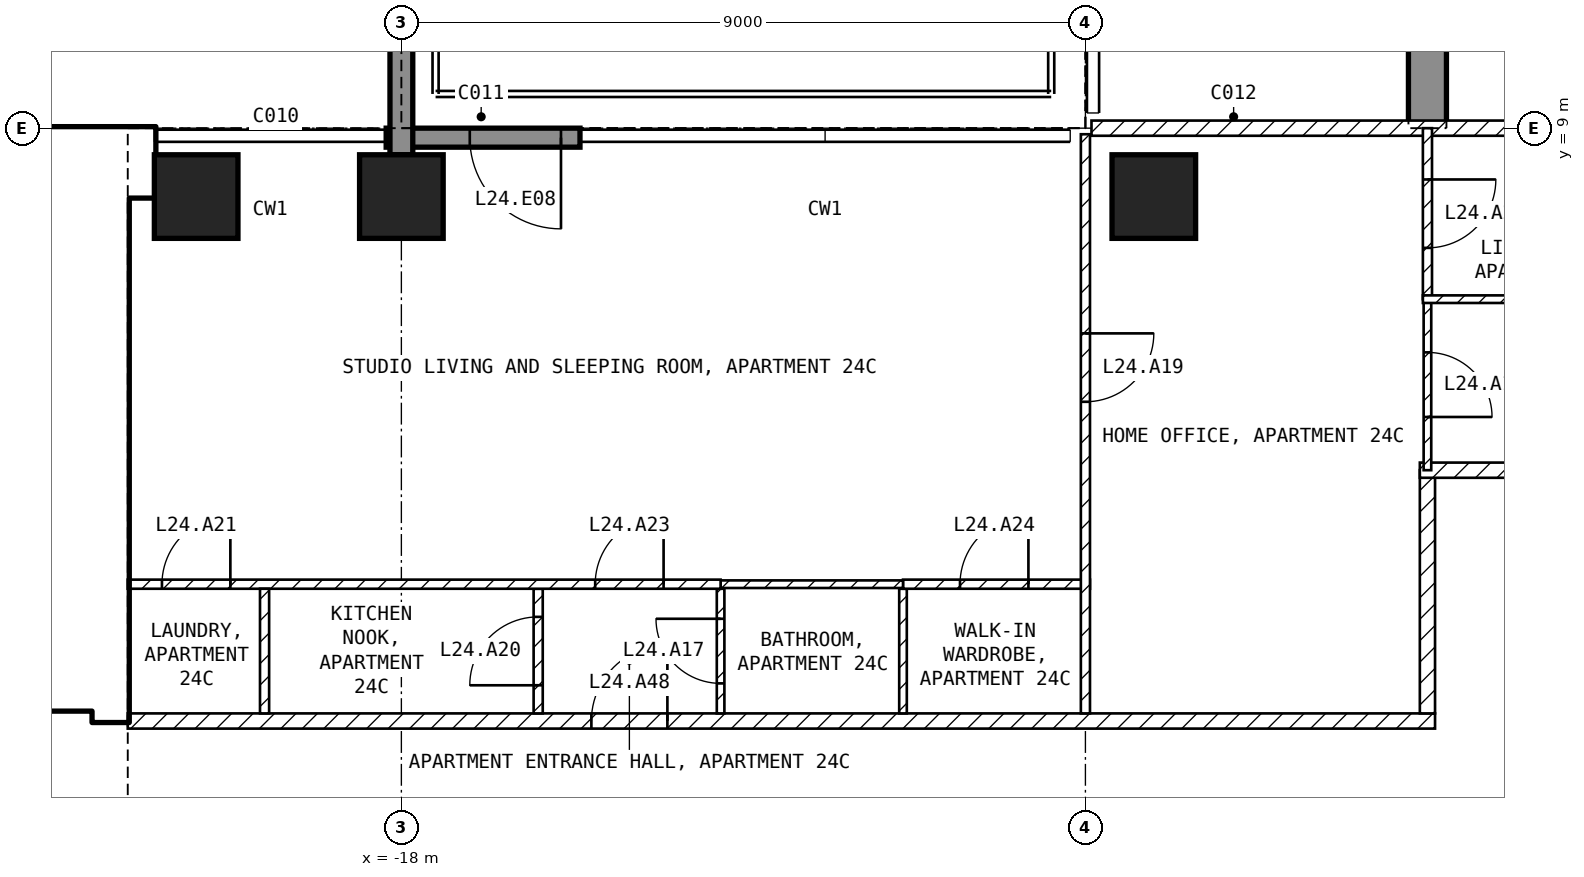
"""IFC4 building model, lengths in metres.
Left out: names, types, materials, properties, quantities, classifications, styles, units other than length and angle.
Written with IfcOpenShell. Run it as: python <this file> out.ifc"""

import sys

from ifc_helpers import new_model, si_unit, direction, frame, frame_2d, origin, origin_2d, place, context, subcontext, project, spatial, polyline, rectangle, outline, extrude, element, fill, save


model = new_model("IFC4")
c1 = context("Model", 3, precision=1e-05, world=origin(), true_north=direction((0.0, 1.0)))
c2 = subcontext(c1, "Body", "Model", "MODEL_VIEW")
j1 = project(units=[si_unit("LENGTHUNIT", "METRE"), si_unit("PLANEANGLEUNIT", "RADIAN")], contexts=[c1])
p1 = place(None, origin())
s1 = spatial("IfcSite", under=j1, at=p1, CompositionType="ELEMENT")
p2 = place(p1, origin())
s2 = spatial("IfcBuilding", under=s1, at=p2, CompositionType="ELEMENT")
p3 = place(p2, frame((0.0, 0.0, 105.9)))
s3 = spatial("IfcBuildingStorey", under=s2, at=p3, CompositionType="ELEMENT", Elevation=105.9)
for number, where, z_axis, x_axis in (
    (1, (-20.7, 8.1, -0.25), (0.0, 0.0, 1.0), (1.0, 0.0, 0.0)),
    (2, (-18.0, 8.1, -0.25), (0.0, 0.0, 1.0), (1.0, 0.0, 0.0)),
    (3, (-8.1, 8.1, -0.25), (0.0, 0.0, 1.0), (1.0, 0.0, 0.0)),
):
    element("IfcColumn", number, at=place(p3, frame(where, z_axis=z_axis, x_axis=x_axis)), inside=s3, PredefinedType="COLUMN", context=c2, shape_type="SweptSolid", body=[
        extrude(rectangle(XDim=1.1, YDim=1.1, at=origin_2d()), origin(), (0.0, 0.0, 1.0), 3.5),
    ])
p4 = place(p3, frame((-4.75, 9.0, -0.25), z_axis=(1.0, 0.0, 0.0), x_axis=(0.0, 1.0, 0.0)))
e4 = element("IfcWall", 4, at=p4, inside=s3, PredefinedType="SHEAR", context=c2, shape_type="SweptSolid", body=[
    extrude(outline(polyline([(0.0, 0.0), (2.1, 0.0), (2.1, 2.65), (4.5, 2.65), (4.5, 0.0), (9.9, 0.0), (9.9, 2.65), (12.3, 2.65), (12.3, 0.0), (16.55, 0.0), (16.55, 3.5), (0.0, 3.5), (0.0, 0.0)])), origin(), (0.0, 0.0, 1.0), 0.5),
])
p5 = place(p3, frame((-15.65, 8.875, 0.0), z_axis=(0.0, 0.0, 1.0), x_axis=(-1.0, 0.0, 0.0)))
e5 = element("IfcWall", 5, at=p5, inside=s3, PredefinedType="SOLIDWALL", context=c2, shape_type="SweptSolid", body=[
    extrude(rectangle(XDim=2.55, YDim=0.25, at=frame_2d((1.275, 0.0))), origin(), (0.0, 0.0, 1.0), 3.25),
])
p6 = place(p5, frame((0.25, 0.0, 0.0)))
e6 = element("IfcOpeningElement", 6, at=p6, cuts=e5, PredefinedType="OPENING", context=c2, shape_type="SweptSolid", body=[
    extrude(rectangle(XDim=1.2, YDim=2.4, at=frame_2d((0.6, 1.2))), frame((0.0, 0.135, 0.0), z_axis=(0.0, -1.0, 0.0), x_axis=(1.0, 0.0, 0.0)), (0.0, 0.0, 1.0), 0.27),
])
p7 = place(p3, frame((-18.0, 8.65, 0.0), z_axis=(0.0, 0.0, 1.0), x_axis=(0.0, 1.0, 0.0)))
e7 = element("IfcWall", 7, at=p7, inside=s3, PredefinedType="SOLIDWALL", context=c2, shape_type="SweptSolid", body=[
    extrude(rectangle(XDim=3.09, YDim=0.3, at=frame_2d((1.545, 0.0))), origin(), (0.0, 0.0, 1.0), 3.25),
])
p8 = place(p3, frame((-29.45, 8.55, 0.0), z_axis=(0.0, 0.0, 1.0), x_axis=(1.0, 0.0, 0.0)))
e8 = element("IfcWall", 8, at=p8, inside=s3, PredefinedType="SHEAR", context=c2, shape_type="SweptSolid", body=[
    extrude(rectangle(XDim=8.2, YDim=0.9, at=frame_2d((4.1, 0.0))), origin(), (0.0, 0.0, 1.0), 3.25),
])
p9 = place(p3, frame((-21.825, 1.2, 0.0), z_axis=(0.0, 0.0, 1.0), x_axis=(0.0, 1.0, 0.0)))
e9 = element("IfcWall", 9, at=p9, inside=s3, PredefinedType="SHEAR", context=c2, shape_type="SweptSolid", body=[
    extrude(rectangle(XDim=6.9, YDim=0.45, at=frame_2d((3.45, 0.0))), origin(), (0.0, 0.0, 1.0), 3.25),
])
p10 = place(p3, frame((-33.05, 1.45, 0.0), z_axis=(0.0, 0.0, 1.0), x_axis=(1.0, 0.0, 0.0)))
e10 = element("IfcWall", 10, at=p10, inside=s3, PredefinedType="SOLIDWALL", context=c2, shape_type="SweptSolid", body=[
    extrude(rectangle(XDim=11.0, YDim=0.2, at=frame_2d((5.5, 0.0))), origin(), (0.0, 0.0, 1.0), 3.25),
])
p11 = place(p10, frame((9.25, 0.0, 0.0)))
e11 = element("IfcOpeningElement", 11, at=p11, cuts=e10, PredefinedType="OPENING", context=c2, shape_type="SweptSolid", body=[
    extrude(rectangle(XDim=1.0, YDim=2.1, at=frame_2d((0.5, 1.05))), frame((0.0, 0.11, 0.0), z_axis=(0.0, -1.0, 0.0), x_axis=(1.0, 0.0, 0.0)), (0.0, 0.0, 1.0), 0.22),
])
p12 = place(p10, frame((6.75, 0.0, 0.0)))
e12 = element("IfcOpeningElement", 12, at=p12, cuts=e10, PredefinedType="OPENING", context=c2, shape_type="SweptSolid", body=[
    extrude(rectangle(XDim=1.0, YDim=2.1, at=frame_2d((0.5, 1.05))), frame((0.0, 0.11, 0.0), z_axis=(0.0, -1.0, 0.0), x_axis=(1.0, 0.0, 0.0)), (0.0, 0.0, 1.0), 0.22),
])
p13 = place(p10, frame((1.025, 0.0, 0.0)))
e13 = element("IfcOpeningElement", 13, at=p13, cuts=e10, PredefinedType="OPENING", context=c2, shape_type="SweptSolid", body=[
    extrude(rectangle(XDim=0.9, YDim=2.1, at=frame_2d((0.45, 1.05))), frame((0.0, 0.11, 0.0), z_axis=(0.0, -1.0, 0.0), x_axis=(1.0, 0.0, 0.0)), (0.0, 0.0, 1.0), 0.22),
])
p14 = place(p3, frame((-28.35, 5.15, 0.0), z_axis=(0.0, 0.0, 1.0), x_axis=(1.0, 0.0, 0.0)))
e14 = element("IfcWall", 14, at=p14, inside=s3, PredefinedType="SOLIDWALL", context=c2, shape_type="SweptSolid", body=[
    extrude(rectangle(XDim=6.3, YDim=0.2, at=frame_2d((3.15, 0.0))), origin(), (0.0, 0.0, 1.0), 3.25),
])
p15 = place(p14, frame((5.1, 0.0, 0.0)))
e15 = element("IfcOpeningElement", 15, at=p15, cuts=e14, PredefinedType="OPENING", context=c2, shape_type="SweptSolid", body=[
    extrude(rectangle(XDim=1.0, YDim=2.1, at=frame_2d((0.5, 1.05))), frame((0.0, 0.11, 0.0), z_axis=(0.0, -1.0, 0.0), x_axis=(1.0, 0.0, 0.0)), (0.0, 0.0, 1.0), 0.22),
])
p16 = place(p3, frame((-21.6, 1.2, 0.0), z_axis=(0.0, 0.0, 1.0), x_axis=(1.0, 0.0, 0.0)))
e16 = element("IfcWall", 16, at=p16, inside=s3, PredefinedType="PARTITIONING", context=c2, shape_type="SweptSolid", body=[
    extrude(rectangle(XDim=17.2, YDim=0.2, at=frame_2d((8.6, 0.0))), origin(), (0.0, 0.0, 1.0), 3.25),
])
p17 = place(p16, frame((6.1, 0.0, 0.0)))
e17 = element("IfcOpeningElement", 17, at=p17, cuts=e16, PredefinedType="OPENING", context=c2, shape_type="SweptSolid", body=[
    extrude(rectangle(XDim=1.0, YDim=2.1, at=frame_2d((0.5, 1.05))), frame((0.0, 0.11, 0.0), z_axis=(0.0, -1.0, 0.0), x_axis=(1.0, 0.0, 0.0)), (0.0, 0.0, 1.0), 0.22),
])
p18 = place(p3, frame((-4.5, 1.3, 0.0), z_axis=(0.0, 0.0, 1.0), x_axis=(0.0, 1.0, 0.0)))
e18 = element("IfcWall", 18, at=p18, inside=s3, PredefinedType="PARTITIONING", context=c2, shape_type="SweptSolid", body=[
    extrude(rectangle(XDim=3.2, YDim=0.2, at=frame_2d((1.6, 0.0))), origin(), (0.0, 0.0, 1.0), 3.25),
])
p19 = place(p3, frame((-4.6, 4.5, 0.0), z_axis=(0.0, 0.0, 1.0), x_axis=(1.0, 0.0, 0.0)))
e19 = element("IfcWall", 19, at=p19, inside=s3, PredefinedType="PARTITIONING", context=c2, shape_type="SweptSolid", body=[
    extrude(rectangle(XDim=3.5, YDim=0.2, at=frame_2d((1.75, 0.0))), origin(), (0.0, 0.0, 1.0), 3.25),
])
p20 = place(p3, frame((-8.92, 9.0, 0.0), z_axis=(0.0, 0.0, 1.0), x_axis=(1.0, 0.0, 0.0)))
e20 = element("IfcWall", 20, at=p20, inside=s3, PredefinedType="PARTITIONING", context=c2, shape_type="SweptSolid", body=[
    extrude(rectangle(XDim=17.84, YDim=0.2, at=frame_2d((8.92, 0.0))), origin(), (0.0, 0.0, 1.0), 3.25),
])
p21 = place(p20, frame((8.42, 0.0, 0.0)))
e21 = element("IfcOpeningElement", 21, at=p21, cuts=e20, PredefinedType="OPENING", context=c2, shape_type="SweptSolid", body=[
    extrude(rectangle(XDim=1.0, YDim=2.1, at=frame_2d((0.5, 1.05))), frame((0.0, 0.11, 0.0), z_axis=(0.0, -1.0, 0.0), x_axis=(1.0, 0.0, 0.0)), (0.0, 0.0, 1.0), 0.22),
])
p22 = place(p3, frame((-11.4, 1.3, 0.0), z_axis=(0.0, 0.0, 1.0), x_axis=(0.0, 1.0, 0.0)))
e22 = element("IfcWall", 22, at=p22, inside=s3, PredefinedType="PARTITIONING", context=c2, shape_type="SweptSolid", body=[
    extrude(rectangle(XDim=1.64, YDim=0.1, at=frame_2d((0.82, 0.0))), origin(), (0.0, 0.0, 1.0), 3.25),
])
p23 = place(p3, frame((-11.4, 3.0, 0.0), z_axis=(0.0, 0.0, 1.0), x_axis=(1.0, 0.0, 0.0)))
e23 = element("IfcWall", 23, at=p23, inside=s3, PredefinedType="PARTITIONING", context=c2, shape_type="SweptSolid", body=[
    extrude(rectangle(XDim=2.46, YDim=0.12, at=frame_2d((1.23, 0.0))), origin(), (0.0, 0.0, 1.0), 3.25),
])
p24 = place(p23, frame((0.75, 0.0, 0.0)))
e24 = element("IfcOpeningElement", 24, at=p24, cuts=e23, PredefinedType="OPENING", context=c2, shape_type="SweptSolid", body=[
    extrude(rectangle(XDim=0.9, YDim=2.1, at=frame_2d((0.45, 1.05))), frame((0.0, 0.07, 0.0), z_axis=(0.0, -1.0, 0.0), x_axis=(1.0, 0.0, 0.0)), (0.0, 0.0, 1.0), 0.14),
])
p25 = place(p3, frame((-9.0, 8.92, 0.0), z_axis=(0.0, 0.0, 1.0), x_axis=(0.0, -1.0, 0.0)))
e25 = element("IfcWall", 25, at=p25, inside=s3, PredefinedType="PARTITIONING", context=c2, shape_type="SweptSolid", body=[
    extrude(rectangle(XDim=7.62, YDim=0.12, at=frame_2d((3.81, 0.0))), origin(), (0.0, 0.0, 1.0), 3.25),
])
p26 = place(p25, frame((2.62, 0.0, 0.0)))
e26 = element("IfcOpeningElement", 26, at=p26, cuts=e25, PredefinedType="OPENING", context=c2, shape_type="SweptSolid", body=[
    extrude(rectangle(XDim=0.9, YDim=2.1, at=frame_2d((0.45, 1.05))), frame((0.0, 0.07, 0.0), z_axis=(0.0, -1.0, 0.0), x_axis=(1.0, 0.0, 0.0)), (0.0, 0.0, 1.0), 0.14),
])
p27 = place(p3, frame((-13.8, 1.3, 0.0), z_axis=(0.0, 0.0, 1.0), x_axis=(0.0, 1.0, 0.0)))
e27 = element("IfcWall", 27, at=p27, inside=s3, PredefinedType="PARTITIONING", context=c2, shape_type="SweptSolid", body=[
    extrude(rectangle(XDim=1.64, YDim=0.1, at=frame_2d((0.82, 0.0))), origin(), (0.0, 0.0, 1.0), 3.25),
])
p28 = place(p27, frame((0.395, 0.0, 0.0)))
e28 = element("IfcOpeningElement", 28, at=p28, cuts=e27, PredefinedType="OPENING", context=c2, shape_type="SweptSolid", body=[
    extrude(rectangle(XDim=0.85, YDim=2.1, at=frame_2d((0.425, 1.05))), frame((0.0, 0.06, 0.0), z_axis=(0.0, -1.0, 0.0), x_axis=(1.0, 0.0, 0.0)), (0.0, 0.0, 1.0), 0.12),
])
p29 = place(p3, frame((-13.8, 3.0, 0.0), z_axis=(0.0, 0.0, 1.0), x_axis=(1.0, 0.0, 0.0)))
e29 = element("IfcWall", 29, at=p29, inside=s3, PredefinedType="PARTITIONING", context=c2, shape_type="SweptSolid", body=[
    extrude(rectangle(XDim=2.4, YDim=0.1, at=frame_2d((1.2, 0.0))), origin(), (0.0, 0.0, 1.0), 3.25),
])
p30 = place(p3, frame((-16.2, 1.3, 0.0), z_axis=(0.0, 0.0, 1.0), x_axis=(0.0, 1.0, 0.0)))
e30 = element("IfcWall", 30, at=p30, inside=s3, PredefinedType="PARTITIONING", context=c2, shape_type="SweptSolid", body=[
    extrude(rectangle(XDim=1.64, YDim=0.12, at=frame_2d((0.82, 0.0))), origin(), (0.0, 0.0, 1.0), 3.25),
])
p31 = place(p30, frame((0.37, 0.0, 0.0)))
e31 = element("IfcOpeningElement", 31, at=p31, cuts=e30, PredefinedType="OPENING", context=c2, shape_type="SweptSolid", body=[
    extrude(rectangle(XDim=0.9, YDim=2.1, at=frame_2d((0.45, 1.05))), frame((0.0, 0.07, 0.0), z_axis=(0.0, -1.0, 0.0), x_axis=(1.0, 0.0, 0.0)), (0.0, 0.0, 1.0), 0.14),
])
p32 = place(p3, frame((-21.6, 3.0, 0.0), z_axis=(0.0, 0.0, 1.0), x_axis=(1.0, 0.0, 0.0)))
e32 = element("IfcWall", 32, at=p32, inside=s3, PredefinedType="PARTITIONING", context=c2, shape_type="SweptSolid", body=[
    extrude(rectangle(XDim=7.8, YDim=0.12, at=frame_2d((3.9, 0.0))), origin(), (0.0, 0.0, 1.0), 3.25),
])
p33 = place(p32, frame((0.45, 0.0, 0.0)))
e33 = element("IfcOpeningElement", 33, at=p33, cuts=e32, PredefinedType="OPENING", context=c2, shape_type="SweptSolid", body=[
    extrude(rectangle(XDim=0.9, YDim=2.1, at=frame_2d((0.45, 1.05))), frame((0.0, 0.07, 0.0), z_axis=(0.0, -1.0, 0.0), x_axis=(1.0, 0.0, 0.0)), (0.0, 0.0, 1.0), 0.14),
])
p34 = place(p32, frame((6.15, 0.0, 0.0)))
e34 = element("IfcOpeningElement", 34, at=p34, cuts=e32, PredefinedType="OPENING", context=c2, shape_type="SweptSolid", body=[
    extrude(rectangle(XDim=0.9, YDim=2.1, at=frame_2d((0.45, 1.05))), frame((0.0, 0.07, 0.0), z_axis=(0.0, -1.0, 0.0), x_axis=(1.0, 0.0, 0.0)), (0.0, 0.0, 1.0), 0.14),
])
p35 = place(p3, frame((-19.8, 1.3, 0.0), z_axis=(0.0, 0.0, 1.0), x_axis=(0.0, 1.0, 0.0)))
e35 = element("IfcWall", 35, at=p35, inside=s3, PredefinedType="PARTITIONING", context=c2, shape_type="SweptSolid", body=[
    extrude(rectangle(XDim=1.64, YDim=0.12, at=frame_2d((0.82, 0.0))), origin(), (0.0, 0.0, 1.0), 3.25),
])
p36 = place(p3, frame((-4.5, 6.75, 0.0), z_axis=(0.0, 0.0, 1.0), x_axis=(0.0, -1.0, 0.0)))
e36 = element("IfcWall", 36, at=p36, inside=s3, PredefinedType="PARTITIONING", context=c2, shape_type="SweptSolid", body=[
    extrude(rectangle(XDim=2.25, YDim=0.1, at=frame_2d((1.125, 0.0))), origin(), (0.0, 0.0, 1.0), 3.25),
])
p37 = place(p36, frame((0.7, 0.0, 0.0)))
e37 = element("IfcOpeningElement", 37, at=p37, cuts=e36, PredefinedType="OPENING", context=c2, shape_type="SweptSolid", body=[
    extrude(rectangle(XDim=0.85, YDim=2.1, at=frame_2d((0.425, 1.05))), frame((0.0, 0.06, 0.0), z_axis=(0.0, -1.0, 0.0), x_axis=(1.0, 0.0, 0.0)), (0.0, 0.0, 1.0), 0.12),
])
p38 = place(p3, frame((-4.5, 9.0, 0.0), z_axis=(0.0, 0.0, 1.0), x_axis=(0.0, -1.0, 0.0)))
e38 = element("IfcWall", 38, at=p38, inside=s3, PredefinedType="PARTITIONING", context=c2, shape_type="SweptSolid", body=[
    extrude(rectangle(XDim=2.25, YDim=0.12, at=frame_2d((1.125, 0.0))), origin(), (0.0, 0.0, 1.0), 3.25),
])
p39 = place(p38, frame((0.675, 0.0, 0.0)))
e39 = element("IfcOpeningElement", 39, at=p39, cuts=e38, PredefinedType="OPENING", context=c2, shape_type="SweptSolid", body=[
    extrude(rectangle(XDim=0.9, YDim=2.1, at=frame_2d((0.45, 1.05))), frame((0.0, 0.07, 0.0), z_axis=(0.0, -1.0, 0.0), x_axis=(1.0, 0.0, 0.0)), (0.0, 0.0, 1.0), 0.14),
])
p40 = place(p3, frame((-4.56, 6.75, 0.0), z_axis=(0.0, 0.0, 1.0), x_axis=(1.0, 0.0, 0.0)))
e40 = element("IfcWall", 40, at=p40, inside=s3, PredefinedType="PARTITIONING", context=c2, shape_type="SweptSolid", body=[
    extrude(rectangle(XDim=3.46, YDim=0.1, at=frame_2d((1.73, 0.0))), origin(), (0.0, 0.0, 1.0), 3.25),
])
p41 = place(p6, origin())
e41 = element("IfcDoor", 41, at=p41, inside=s3, OperationType="SINGLE_SWING_LEFT", PredefinedType="DOOR", context=c2, shape_type="SweptSolid", body=[
    extrude(rectangle(XDim=1.2, YDim=2.4, at=frame_2d((0.6, 1.2))), frame((0.0, 0.025, 0.0), z_axis=(0.0, -1.0, 0.0), x_axis=(1.0, 0.0, 0.0)), (0.0, 0.0, 1.0), 0.05),
])
fill(e6, e41)
p42 = place(p15, origin())
e42 = element("IfcDoor", 42, at=p42, inside=s3, OperationType="SINGLE_SWING_LEFT", PredefinedType="DOOR", context=c2, shape_type="SweptSolid", body=[
    extrude(rectangle(XDim=1.0, YDim=2.1, at=frame_2d((0.5, 1.05))), frame((0.0, 0.025, 0.0), z_axis=(0.0, -1.0, 0.0), x_axis=(1.0, 0.0, 0.0)), (0.0, 0.0, 1.0), 0.05),
])
fill(e15, e42)
p43 = place(p28, origin())
e43 = element("IfcDoor", 43, at=p43, inside=s3, OperationType="SINGLE_SWING_RIGHT", PredefinedType="DOOR", context=c2, shape_type="SweptSolid", body=[
    extrude(rectangle(XDim=0.85, YDim=2.1, at=frame_2d((0.425, 1.05))), frame((0.0, 0.025, 0.0), z_axis=(0.0, -1.0, 0.0), x_axis=(1.0, 0.0, 0.0)), (0.0, 0.0, 1.0), 0.05),
])
fill(e28, e43)
p44 = place(p37, origin())
e44 = element("IfcDoor", 44, at=p44, inside=s3, OperationType="SINGLE_SWING_RIGHT", PredefinedType="DOOR", context=c2, shape_type="SweptSolid", body=[
    extrude(rectangle(XDim=0.85, YDim=2.1, at=frame_2d((0.425, 1.05))), frame((0.0, 0.025, 0.0), z_axis=(0.0, -1.0, 0.0), x_axis=(1.0, 0.0, 0.0)), (0.0, 0.0, 1.0), 0.05),
])
fill(e37, e44)
p45 = place(p26, origin())
e45 = element("IfcDoor", 45, at=p45, inside=s3, OperationType="SINGLE_SWING_LEFT", PredefinedType="DOOR", context=c2, shape_type="SweptSolid", body=[
    extrude(rectangle(XDim=0.9, YDim=2.1, at=frame_2d((0.45, 1.05))), frame((0.0, 0.025, 0.0), z_axis=(0.0, -1.0, 0.0), x_axis=(1.0, 0.0, 0.0)), (0.0, 0.0, 1.0), 0.05),
])
fill(e26, e45)
p46 = place(p31, origin())
e46 = element("IfcDoor", 46, at=p46, inside=s3, OperationType="SINGLE_SWING_LEFT", PredefinedType="DOOR", context=c2, shape_type="SweptSolid", body=[
    extrude(rectangle(XDim=0.9, YDim=2.1, at=frame_2d((0.45, 1.05))), frame((0.0, 0.025, 0.0), z_axis=(0.0, -1.0, 0.0), x_axis=(1.0, 0.0, 0.0)), (0.0, 0.0, 1.0), 0.05),
])
fill(e31, e46)
p47 = place(p33, origin())
e47 = element("IfcDoor", 47, at=p47, inside=s3, OperationType="SINGLE_SWING_RIGHT", PredefinedType="DOOR", context=c2, shape_type="SweptSolid", body=[
    extrude(rectangle(XDim=0.9, YDim=2.1, at=frame_2d((0.45, 1.05))), frame((0.0, 0.025, 0.0), z_axis=(0.0, -1.0, 0.0), x_axis=(1.0, 0.0, 0.0)), (0.0, 0.0, 1.0), 0.05),
])
fill(e33, e47)
p48 = place(p39, origin())
e48 = element("IfcDoor", 48, at=p48, inside=s3, OperationType="SINGLE_SWING_LEFT", PredefinedType="DOOR", context=c2, shape_type="SweptSolid", body=[
    extrude(rectangle(XDim=0.9, YDim=2.1, at=frame_2d((0.45, 1.05))), frame((0.0, 0.025, 0.0), z_axis=(0.0, -1.0, 0.0), x_axis=(1.0, 0.0, 0.0)), (0.0, 0.0, 1.0), 0.05),
])
fill(e39, e48)
p49 = place(p34, origin())
e49 = element("IfcDoor", 49, at=p49, inside=s3, OperationType="SINGLE_SWING_RIGHT", PredefinedType="DOOR", context=c2, shape_type="SweptSolid", body=[
    extrude(rectangle(XDim=0.9, YDim=2.1, at=frame_2d((0.45, 1.05))), frame((0.0, 0.025, 0.0), z_axis=(0.0, -1.0, 0.0), x_axis=(1.0, 0.0, 0.0)), (0.0, 0.0, 1.0), 0.05),
])
fill(e34, e49)
p50 = place(p24, origin())
e50 = element("IfcDoor", 50, at=p50, inside=s3, OperationType="SINGLE_SWING_RIGHT", PredefinedType="DOOR", context=c2, shape_type="SweptSolid", body=[
    extrude(rectangle(XDim=0.9, YDim=2.1, at=frame_2d((0.45, 1.05))), frame((0.0, 0.025, 0.0), z_axis=(0.0, -1.0, 0.0), x_axis=(1.0, 0.0, 0.0)), (0.0, 0.0, 1.0), 0.05),
])
fill(e24, e50)
p51 = place(p17, origin())
e51 = element("IfcDoor", 51, at=p51, inside=s3, OperationType="SINGLE_SWING_RIGHT", PredefinedType="DOOR", context=c2, shape_type="SweptSolid", body=[
    extrude(rectangle(XDim=1.0, YDim=2.1, at=frame_2d((0.5, 1.05))), frame((0.0, 0.025, 0.0), z_axis=(0.0, -1.0, 0.0), x_axis=(1.0, 0.0, 0.0)), (0.0, 0.0, 1.0), 0.05),
])
fill(e17, e51)
save(model, sys.argv[1])
